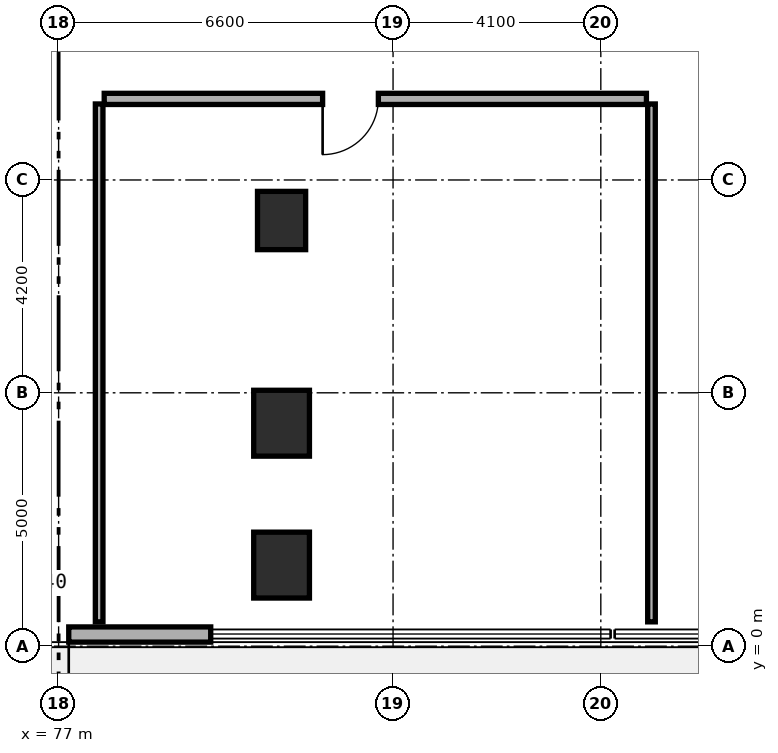
"""IFC4 building model, lengths in metres.
Left out: names, types, materials, properties, quantities, classifications, styles, units other than length and angle.
Written with IfcOpenShell. Run it as: python <this file> out.ifc"""

import sys

from ifc_helpers import new_model, si_unit, direction, frame, frame_2d, origin, origin_2d, place, context, subcontext, project, spatial, rectangle, extrude, element, fill, save


model = new_model("IFC4")
c1 = context("Model", 3, precision=1e-05, world=origin(), true_north=direction((0.0, 1.0)))
c2 = subcontext(c1, "Body", "Model", "MODEL_VIEW")
j1 = project(units=[si_unit("LENGTHUNIT", "METRE"), si_unit("PLANEANGLEUNIT", "RADIAN")], contexts=[c1])
p1 = place(None, origin())
s1 = spatial("IfcSite", under=j1, at=p1, CompositionType="ELEMENT")
p2 = place(p1, origin())
s2 = spatial("IfcBuilding", under=s1, at=p2, CompositionType="ELEMENT")
p3 = place(p2, origin())
s3 = spatial("IfcBuildingStorey", under=s2, at=p3, CompositionType="ELEMENT", Elevation=0.0)
p4 = place(p3, frame((81.4, 8.4, 0.0), z_axis=(0.0, 0.0, 1.0), x_axis=(1.0, 0.0, 0.0)))
e1 = element("IfcColumn", 1, at=p4, inside=s3, PredefinedType="COLUMN", context=c2, shape_type="SweptSolid", body=[
    extrude(rectangle(XDim=0.95, YDim=1.15, at=origin_2d()), origin(), (0.0, 0.0, 1.0), 5.4),
])
for number, where, z_axis, x_axis in (
    (2, (81.4, 1.6, 0.0), (0.0, 0.0, 1.0), (1.0, 0.0, 0.0)),
    (3, (81.4, 4.4, 0.0), (0.0, 0.0, 1.0), (1.0, 0.0, 0.0)),
):
    element("IfcColumn", number, at=place(p3, frame(where, z_axis=z_axis, x_axis=x_axis)), inside=s3, PredefinedType="COLUMN", context=c2, shape_type="SweptSolid", body=[
        extrude(rectangle(XDim=1.1, YDim=1.3, at=origin_2d()), origin(), (0.0, 0.0, 1.0), 5.4),
    ])
p5 = place(p3, frame((71.952, 0.23, 0.0), z_axis=(0.0, 0.0, 1.0), x_axis=(1.0, 0.0, 0.0)))
e4 = element("IfcWall", 4, at=p5, inside=s3, PredefinedType="STANDARD", context=c2, shape_type="SweptSolid", body=[
    extrude(rectangle(XDim=8.05, YDim=0.3, at=frame_2d((4.025, 0.0))), origin(), (0.0, 0.0, 1.0), 5.05),
])
p6 = place(p5, frame((1.348, 0.0, 0.0)))
e5 = element("IfcOpeningElement", 5, at=p6, cuts=e4, PredefinedType="OPENING", context=c2, shape_type="SweptSolid", body=[
    extrude(rectangle(XDim=1.4, YDim=2.2, at=frame_2d((0.7, 1.1))), frame((0.0, 0.16, 0.0), z_axis=(0.0, -1.0, 0.0), x_axis=(1.0, 0.0, 0.0)), (0.0, 0.0, 1.0), 0.32),
])
p7 = place(p5, frame((2.848, 0.0, 0.0)))
e6 = element("IfcOpeningElement", 6, at=p7, cuts=e4, PredefinedType="OPENING", context=c2, shape_type="SweptSolid", body=[
    extrude(rectangle(XDim=2.4, YDim=2.6, at=frame_2d((1.2, 1.3))), frame((0.0, 0.16, 0.0), z_axis=(0.0, -1.0, 0.0), x_axis=(1.0, 0.0, 0.0)), (0.0, 0.0, 1.0), 0.32),
])
p8 = place(p3, frame((77.8, 0.48, 0.0), z_axis=(0.0, 0.0, 1.0), x_axis=(0.0, 1.0, 0.0)))
e7 = element("IfcWall", 7, at=p8, inside=s3, PredefinedType="PARTITIONING", context=c2, shape_type="SweptSolid", body=[
    extrude(rectangle(XDim=10.22, YDim=0.15, at=frame_2d((5.11, 0.0))), origin(), (0.0, 0.0, 1.0), 4.425),
])
p9 = place(p3, frame((88.7, 0.48, 0.0), z_axis=(0.0, 0.0, 1.0), x_axis=(0.0, 1.0, 0.0)))
e8 = element("IfcWall", 8, at=p9, inside=s3, PredefinedType="PARTITIONING", context=c2, shape_type="SweptSolid", body=[
    extrude(rectangle(XDim=10.22, YDim=0.15, at=frame_2d((5.11, 0.0))), origin(), (0.0, 0.0, 1.0), 4.225),
])
p10 = place(p3, frame((77.9, 10.8, 0.0), z_axis=(0.0, 0.0, 1.0), x_axis=(1.0, 0.0, 0.0)))
e9 = element("IfcWall", 9, at=p10, inside=s3, PredefinedType="SOLIDWALL", context=c2, shape_type="SweptSolid", body=[
    extrude(rectangle(XDim=10.7, YDim=0.22, at=frame_2d((5.35, 0.0))), origin(), (0.0, 0.0, 1.0), 4.525),
])
p11 = place(p10, frame((4.31, 0.0, 0.0)))
e10 = element("IfcOpeningElement", 10, at=p11, cuts=e9, PredefinedType="OPENING", context=c2, shape_type="SweptSolid", body=[
    extrude(rectangle(XDim=1.1, YDim=2.1, at=frame_2d((0.55, 1.05))), frame((0.0, 0.12, 0.0), z_axis=(0.0, -1.0, 0.0), x_axis=(1.0, 0.0, 0.0)), (0.0, 0.0, 1.0), 0.24),
])
p12 = place(p7, frame((2.4, 0.0, 0.0), z_axis=(0.0, 0.0, 1.0), x_axis=(-1.0, 0.0, 0.0)))
e11 = element("IfcDoor", 11, at=p12, inside=s3, OperationType="DOUBLE_DOOR_SINGLE_SWING", PredefinedType="DOOR", context=c2, shape_type="SweptSolid", body=[
    extrude(rectangle(XDim=2.4, YDim=2.6, at=frame_2d((1.2, 1.3))), frame((0.0, 0.025, 0.0), z_axis=(0.0, -1.0, 0.0), x_axis=(1.0, 0.0, 0.0)), (0.0, 0.0, 1.0), 0.05),
])
fill(e6, e11)
p13 = place(p11, frame((1.1, 0.0, 0.0), z_axis=(0.0, 0.0, 1.0), x_axis=(-1.0, 0.0, 0.0)))
e12 = element("IfcDoor", 12, at=p13, inside=s3, OperationType="SINGLE_SWING_RIGHT", PredefinedType="DOOR", context=c2, shape_type="SweptSolid", body=[
    extrude(rectangle(XDim=1.1, YDim=2.1, at=frame_2d((0.55, 1.05))), frame((0.0, 0.025, 0.0), z_axis=(0.0, -1.0, 0.0), x_axis=(1.0, 0.0, 0.0)), (0.0, 0.0, 1.0), 0.05),
])
fill(e10, e12)
save(model, sys.argv[1])
